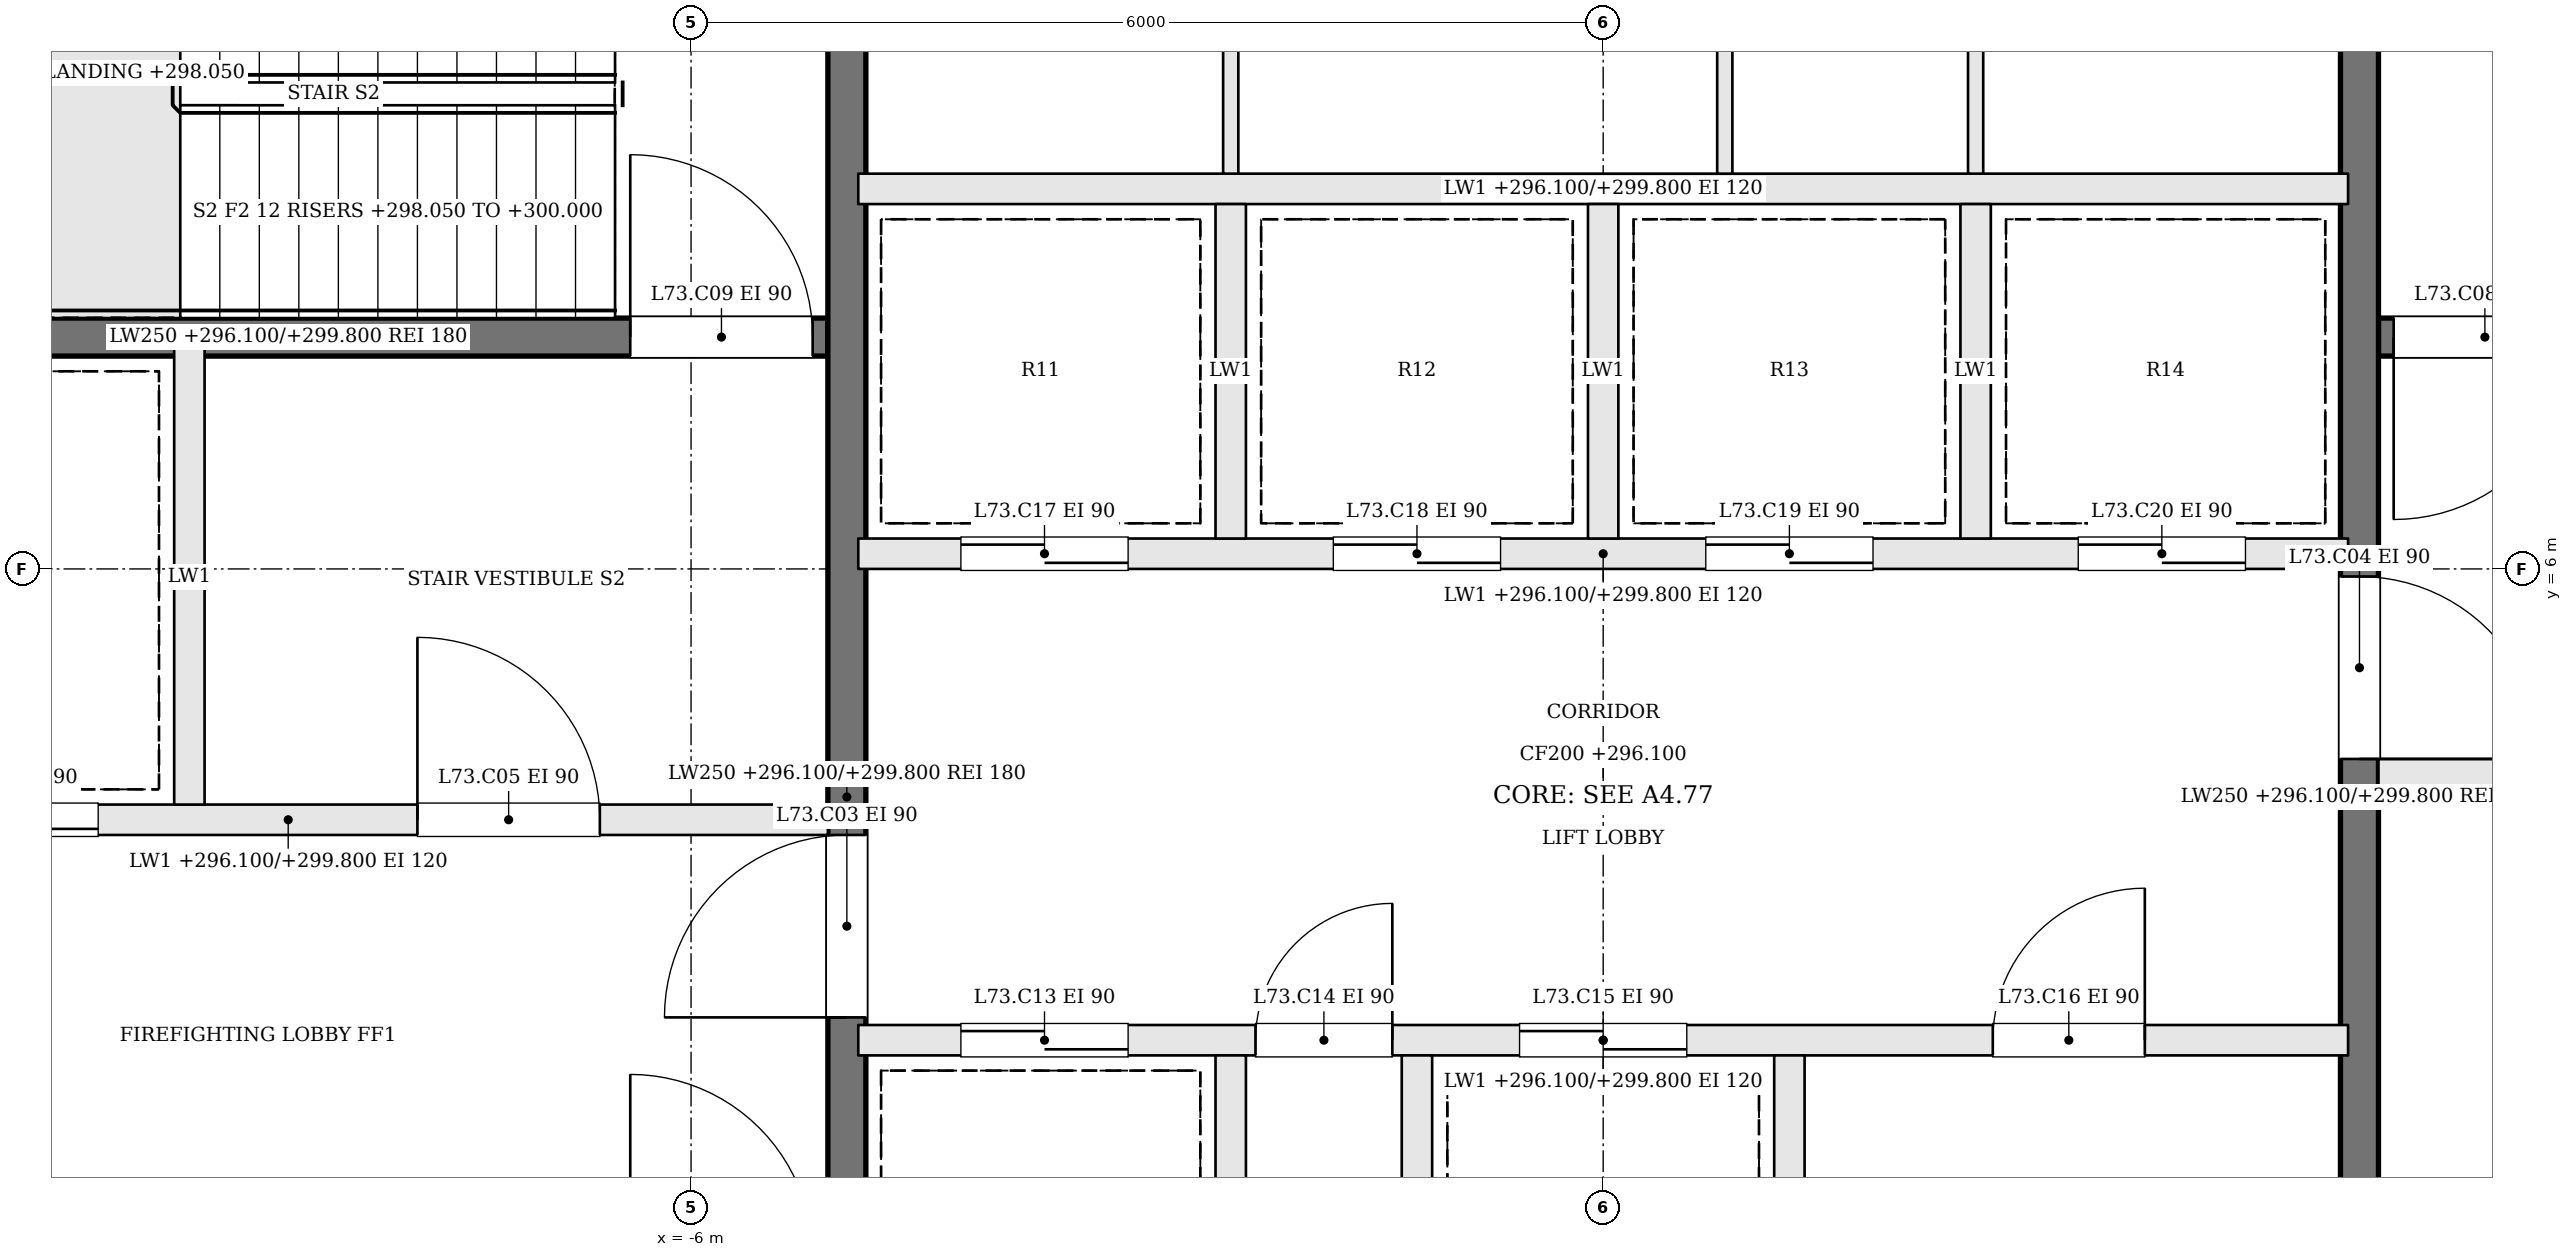
"""IFC4 building model, lengths in metres.
Left out: names, types, materials, properties, quantities, classifications, styles, units other than length and angle.
Written with IfcOpenShell. Run it as: python <this file> out.ifc"""

import sys

from ifc_helpers import new_model, si_unit, direction, frame, frame_2d, origin, place, context, subcontext, project, spatial, rectangle, extrude, element, fill, save


model = new_model("IFC4")
c1 = context("Model", 3, precision=1e-05, world=origin(), true_north=direction((0.0, 1.0)))
c2 = subcontext(c1, "Body", "Model", "MODEL_VIEW")
j1 = project(units=[si_unit("LENGTHUNIT", "METRE"), si_unit("PLANEANGLEUNIT", "RADIAN")], contexts=[c1])
p1 = place(None, origin())
s1 = spatial("IfcSite", under=j1, at=p1, CompositionType="ELEMENT")
p2 = place(p1, origin())
s2 = spatial("IfcBuilding", under=s1, at=p2, CompositionType="ELEMENT")
p3 = place(p2, frame((0.0, 0.0, 296.1)))
s3 = spatial("IfcBuildingStorey", under=s2, at=p3, CompositionType="ELEMENT", Elevation=296.1)
p4 = place(p3, frame((12.2, 7.525, 0.0), z_axis=(0.0, 0.0, 1.0), x_axis=(-1.0, 0.0, 0.0)))
e1 = element("IfcWall", 1, at=p4, inside=s3, PredefinedType="SOLIDWALL", context=c2, shape_type="SweptSolid", body=[
    extrude(rectangle(XDim=7.1, YDim=0.25, at=frame_2d((3.55, 0.0))), origin(), (0.0, 0.0, 1.0), 3.7),
])
p5 = place(p4, frame((5.8, 0.0, 0.0)))
e2 = element("IfcOpeningElement", 2, at=p5, cuts=e1, PredefinedType="OPENING", context=c2, shape_type="SweptSolid", body=[
    extrude(rectangle(XDim=1.2, YDim=2.1, at=frame_2d((0.6, 1.05))), frame((0.0, 0.135, 0.0), z_axis=(0.0, -1.0, 0.0), x_axis=(1.0, 0.0, 0.0)), (0.0, 0.0, 1.0), 0.27),
])
p6 = place(p3, frame((-12.2, 4.35, 0.0), z_axis=(0.0, 0.0, 1.0), x_axis=(1.0, 0.0, 0.0)))
e3 = element("IfcWall", 3, at=p6, inside=s3, PredefinedType="SOLIDWALL", context=c2, shape_type="SweptSolid", body=[
    extrude(rectangle(XDim=7.1, YDim=0.2, at=frame_2d((3.55, 0.0))), origin(), (0.0, 0.0, 1.0), 3.7),
])
p7 = place(p6, frame((4.4, 0.0, 0.0)))
e4 = element("IfcOpeningElement", 4, at=p7, cuts=e3, PredefinedType="OPENING", context=c2, shape_type="SweptSolid", body=[
    extrude(rectangle(XDim=1.2, YDim=2.1, at=frame_2d((0.6, 1.05))), frame((0.0, 0.11, 0.0), z_axis=(0.0, -1.0, 0.0), x_axis=(1.0, 0.0, 0.0)), (0.0, 0.0, 1.0), 0.22),
])
p8 = place(p6, frame((1.1, 0.0, 0.0)))
e5 = element("IfcOpeningElement", 5, at=p8, cuts=e3, PredefinedType="OPENING", context=c2, shape_type="SweptSolid", body=[
    extrude(rectangle(XDim=1.2, YDim=2.1, at=frame_2d((0.6, 1.05))), frame((0.0, 0.11, 0.0), z_axis=(0.0, -1.0, 0.0), x_axis=(1.0, 0.0, 0.0)), (0.0, 0.0, 1.0), 0.22),
])
p9 = place(p3, frame((12.2, 4.65, 0.0), z_axis=(0.0, 0.0, 1.0), x_axis=(-1.0, 0.0, 0.0)))
e6 = element("IfcWall", 6, at=p9, inside=s3, PredefinedType="SOLIDWALL", context=c2, shape_type="SweptSolid", body=[
    extrude(rectangle(XDim=7.1, YDim=0.2, at=frame_2d((3.55, 0.0))), origin(), (0.0, 0.0, 1.0), 3.7),
])
p10 = place(p9, frame((4.4, 0.0, 0.0)))
e7 = element("IfcOpeningElement", 7, at=p10, cuts=e6, PredefinedType="OPENING", context=c2, shape_type="SweptSolid", body=[
    extrude(rectangle(XDim=1.2, YDim=2.1, at=frame_2d((0.6, 1.05))), frame((0.0, 0.11, 0.0), z_axis=(0.0, -1.0, 0.0), x_axis=(1.0, 0.0, 0.0)), (0.0, 0.0, 1.0), 0.22),
])
p11 = place(p9, frame((1.1, 0.0, 0.0)))
e8 = element("IfcOpeningElement", 8, at=p11, cuts=e6, PredefinedType="OPENING", context=c2, shape_type="SweptSolid", body=[
    extrude(rectangle(XDim=1.2, YDim=2.1, at=frame_2d((0.6, 1.05))), frame((0.0, 0.11, 0.0), z_axis=(0.0, -1.0, 0.0), x_axis=(1.0, 0.0, 0.0)), (0.0, 0.0, 1.0), 0.22),
])
p12 = place(p3, frame((-12.2, 7.525, 0.0), z_axis=(0.0, 0.0, 1.0), x_axis=(1.0, 0.0, 0.0)))
e9 = element("IfcWall", 9, at=p12, inside=s3, PredefinedType="SOLIDWALL", context=c2, shape_type="SweptSolid", body=[
    extrude(rectangle(XDim=7.1, YDim=0.25, at=frame_2d((3.55, 0.0))), origin(), (0.0, 0.0, 1.0), 3.7),
])
p13 = place(p12, frame((5.8, 0.0, 0.0)))
e10 = element("IfcOpeningElement", 10, at=p13, cuts=e9, PredefinedType="OPENING", context=c2, shape_type="SweptSolid", body=[
    extrude(rectangle(XDim=1.2, YDim=2.1, at=frame_2d((0.6, 1.05))), frame((0.0, 0.135, 0.0), z_axis=(0.0, -1.0, 0.0), x_axis=(1.0, 0.0, 0.0)), (0.0, 0.0, 1.0), 0.27),
])
p14 = place(p3, frame((-9.3, 4.45, 0.0), z_axis=(0.0, 0.0, 1.0), x_axis=(0.0, 1.0, 0.0)))
e11 = element("IfcWall", 11, at=p14, inside=s3, PredefinedType="SOLIDWALL", context=c2, shape_type="SweptSolid", body=[
    extrude(rectangle(XDim=3.0, YDim=0.2, at=frame_2d((1.5, 0.0))), origin(), (0.0, 0.0, 1.0), 3.7),
])
p15 = place(p3, frame((-4.975, -2.2, 0.0), z_axis=(0.0, 0.0, 1.0), x_axis=(0.0, 1.0, 0.0)))
e12 = element("IfcWall", 12, at=p15, inside=s3, PredefinedType="SOLIDWALL", context=c2, shape_type="SweptSolid", body=[
    extrude(rectangle(XDim=13.4, YDim=0.25, at=frame_2d((6.7, 0.0))), origin(), (0.0, 0.0, 1.0), 3.7),
])
p16 = place(p15, frame((5.25, 0.0, 0.0)))
e13 = element("IfcOpeningElement", 13, at=p16, cuts=e12, PredefinedType="OPENING", context=c2, shape_type="SweptSolid", body=[
    extrude(rectangle(XDim=1.2, YDim=2.1, at=frame_2d((0.6, 1.05))), frame((0.0, 0.135, 0.0), z_axis=(0.0, -1.0, 0.0), x_axis=(1.0, 0.0, 0.0)), (0.0, 0.0, 1.0), 0.27),
])
p17 = place(p3, frame((4.975, 11.2, 0.0), z_axis=(0.0, 0.0, 1.0), x_axis=(0.0, -1.0, 0.0)))
e14 = element("IfcWall", 14, at=p17, inside=s3, PredefinedType="SOLIDWALL", context=c2, shape_type="SweptSolid", body=[
    extrude(rectangle(XDim=13.4, YDim=0.25, at=frame_2d((6.7, 0.0))), origin(), (0.0, 0.0, 1.0), 3.7),
])
p18 = place(p17, frame((5.25, 0.0, 0.0)))
e15 = element("IfcOpeningElement", 15, at=p18, cuts=e14, PredefinedType="OPENING", context=c2, shape_type="SweptSolid", body=[
    extrude(rectangle(XDim=1.2, YDim=2.1, at=frame_2d((0.6, 1.05))), frame((0.0, 0.135, 0.0), z_axis=(0.0, -1.0, 0.0), x_axis=(1.0, 0.0, 0.0)), (0.0, 0.0, 1.0), 0.27),
])
p19 = place(p3, frame((-4.9, 2.9, 0.0), z_axis=(0.0, 0.0, 1.0), x_axis=(1.0, 0.0, 0.0)))
e16 = element("IfcWall", 16, at=p19, inside=s3, PredefinedType="SOLIDWALL", context=c2, shape_type="SweptSolid", body=[
    extrude(rectangle(XDim=9.8, YDim=0.2, at=frame_2d((4.9, 0.0))), origin(), (0.0, 0.0, 1.0), 3.7),
])
p20 = place(p19, frame((0.675, 0.0, 0.0)))
e17 = element("IfcOpeningElement", 17, at=p20, cuts=e16, PredefinedType="OPENING", context=c2, shape_type="SweptSolid", body=[
    extrude(rectangle(XDim=1.1, YDim=2.1, at=frame_2d((0.55, 1.05))), frame((0.0, 0.11, 0.0), z_axis=(0.0, -1.0, 0.0), x_axis=(1.0, 0.0, 0.0)), (0.0, 0.0, 1.0), 0.22),
])
p21 = place(p19, frame((2.613, 0.0, 0.0)))
e18 = element("IfcOpeningElement", 18, at=p21, cuts=e16, PredefinedType="OPENING", context=c2, shape_type="SweptSolid", body=[
    extrude(rectangle(XDim=0.9, YDim=2.1, at=frame_2d((0.45, 1.05))), frame((0.0, 0.11, 0.0), z_axis=(0.0, -1.0, 0.0), x_axis=(1.0, 0.0, 0.0)), (0.0, 0.0, 1.0), 0.22),
])
p22 = place(p19, frame((4.35, 0.0, 0.0)))
e19 = element("IfcOpeningElement", 19, at=p22, cuts=e16, PredefinedType="OPENING", context=c2, shape_type="SweptSolid", body=[
    extrude(rectangle(XDim=1.1, YDim=2.1, at=frame_2d((0.55, 1.05))), frame((0.0, 0.11, 0.0), z_axis=(0.0, -1.0, 0.0), x_axis=(1.0, 0.0, 0.0)), (0.0, 0.0, 1.0), 0.22),
])
p23 = place(p19, frame((7.463, 0.0, 0.0)))
e20 = element("IfcOpeningElement", 20, at=p23, cuts=e16, PredefinedType="OPENING", context=c2, shape_type="SweptSolid", body=[
    extrude(rectangle(XDim=1.0, YDim=2.1, at=frame_2d((0.5, 1.05))), frame((0.0, 0.11, 0.0), z_axis=(0.0, -1.0, 0.0), x_axis=(1.0, 0.0, 0.0)), (0.0, 0.0, 1.0), 0.22),
])
p24 = place(p3, frame((-4.9, 6.1, 0.0), z_axis=(0.0, 0.0, 1.0), x_axis=(1.0, 0.0, 0.0)))
e21 = element("IfcWall", 21, at=p24, inside=s3, PredefinedType="SOLIDWALL", context=c2, shape_type="SweptSolid", body=[
    extrude(rectangle(XDim=9.8, YDim=0.2, at=frame_2d((4.9, 0.0))), origin(), (0.0, 0.0, 1.0), 3.7),
])
p25 = place(p24, frame((0.675, 0.0, 0.0)))
e22 = element("IfcOpeningElement", 22, at=p25, cuts=e21, PredefinedType="OPENING", context=c2, shape_type="SweptSolid", body=[
    extrude(rectangle(XDim=1.1, YDim=2.1, at=frame_2d((0.55, 1.05))), frame((0.0, 0.11, 0.0), z_axis=(0.0, -1.0, 0.0), x_axis=(1.0, 0.0, 0.0)), (0.0, 0.0, 1.0), 0.22),
])
p26 = place(p24, frame((3.125, 0.0, 0.0)))
e23 = element("IfcOpeningElement", 23, at=p26, cuts=e21, PredefinedType="OPENING", context=c2, shape_type="SweptSolid", body=[
    extrude(rectangle(XDim=1.1, YDim=2.1, at=frame_2d((0.55, 1.05))), frame((0.0, 0.11, 0.0), z_axis=(0.0, -1.0, 0.0), x_axis=(1.0, 0.0, 0.0)), (0.0, 0.0, 1.0), 0.22),
])
p27 = place(p24, frame((5.575, 0.0, 0.0)))
e24 = element("IfcOpeningElement", 24, at=p27, cuts=e21, PredefinedType="OPENING", context=c2, shape_type="SweptSolid", body=[
    extrude(rectangle(XDim=1.1, YDim=2.1, at=frame_2d((0.55, 1.05))), frame((0.0, 0.11, 0.0), z_axis=(0.0, -1.0, 0.0), x_axis=(1.0, 0.0, 0.0)), (0.0, 0.0, 1.0), 0.22),
])
p28 = place(p24, frame((8.025, 0.0, 0.0)))
e25 = element("IfcOpeningElement", 25, at=p28, cuts=e21, PredefinedType="OPENING", context=c2, shape_type="SweptSolid", body=[
    extrude(rectangle(XDim=1.1, YDim=2.1, at=frame_2d((0.55, 1.05))), frame((0.0, 0.11, 0.0), z_axis=(0.0, -1.0, 0.0), x_axis=(1.0, 0.0, 0.0)), (0.0, 0.0, 1.0), 0.22),
])
p29 = place(p3, frame((-4.9, 8.5, 0.0), z_axis=(0.0, 0.0, 1.0), x_axis=(1.0, 0.0, 0.0)))
e26 = element("IfcWall", 26, at=p29, inside=s3, PredefinedType="SOLIDWALL", context=c2, shape_type="SweptSolid", body=[
    extrude(rectangle(XDim=9.8, YDim=0.2, at=frame_2d((4.9, 0.0))), origin(), (0.0, 0.0, 1.0), 3.7),
])
for number, where, z_axis, x_axis in (
    (27, (-2.45, 0.6, 0.0), (0.0, 0.0, 1.0), (0.0, 1.0, 0.0)),
    (28, (-1.225, 0.6, 0.0), (0.0, 0.0, 1.0), (0.0, 1.0, 0.0)),
    (29, (1.225, 0.6, 0.0), (0.0, 0.0, 1.0), (0.0, 1.0, 0.0)),
    (30, (-2.45, 6.2, 0.0), (0.0, 0.0, 1.0), (0.0, 1.0, 0.0)),
    (31, (0.0, 6.2, 0.0), (0.0, 0.0, 1.0), (0.0, 1.0, 0.0)),
    (32, (2.45, 6.2, 0.0), (0.0, 0.0, 1.0), (0.0, 1.0, 0.0)),
):
    element("IfcWall", number, at=place(p3, frame(where, z_axis=z_axis, x_axis=x_axis)), inside=s3, PredefinedType="SOLIDWALL", context=c2, shape_type="SweptSolid", body=[
        extrude(rectangle(XDim=2.2, YDim=0.2, at=frame_2d((1.1, 0.0))), origin(), (0.0, 0.0, 1.0), 3.7),
    ])
for number, where, z_axis, x_axis in (
    (33, (-2.45, 8.6, 0.0), (0.0, 0.0, 1.0), (0.0, 1.0, 0.0)),
    (34, (0.8, 8.6, 0.0), (0.0, 0.0, 1.0), (0.0, 1.0, 0.0)),
    (35, (2.45, 8.6, 0.0), (0.0, 0.0, 1.0), (0.0, 1.0, 0.0)),
):
    element("IfcWall", number, at=place(p3, frame(where, z_axis=z_axis, x_axis=x_axis)), inside=s3, PredefinedType="PARTITIONING", context=c2, shape_type="SweptSolid", body=[
        extrude(rectangle(XDim=2.6, YDim=0.1, at=frame_2d((1.3, 0.0))), origin(), (0.0, 0.0, 1.0), 3.7),
    ])
p30 = place(p16, origin())
e36 = element("IfcDoor", 36, at=p30, inside=s3, OperationType="SINGLE_SWING_LEFT", PredefinedType="DOOR", context=c2, shape_type="SweptSolid", body=[
    extrude(rectangle(XDim=1.2, YDim=2.1, at=frame_2d((0.6, 1.05))), frame((0.0, 0.025, 0.0), z_axis=(0.0, -1.0, 0.0), x_axis=(1.0, 0.0, 0.0)), (0.0, 0.0, 1.0), 0.05),
])
fill(e13, e36)
p31 = place(p18, origin())
e37 = element("IfcDoor", 37, at=p31, inside=s3, OperationType="SINGLE_SWING_RIGHT", PredefinedType="DOOR", context=c2, shape_type="SweptSolid", body=[
    extrude(rectangle(XDim=1.2, YDim=2.1, at=frame_2d((0.6, 1.05))), frame((0.0, 0.025, 0.0), z_axis=(0.0, -1.0, 0.0), x_axis=(1.0, 0.0, 0.0)), (0.0, 0.0, 1.0), 0.05),
])
fill(e15, e37)
p32 = place(p7, origin())
e38 = element("IfcDoor", 38, at=p32, inside=s3, OperationType="SINGLE_SWING_LEFT", PredefinedType="DOOR", context=c2, shape_type="SweptSolid", body=[
    extrude(rectangle(XDim=1.2, YDim=2.1, at=frame_2d((0.6, 1.05))), frame((0.0, 0.025, 0.0), z_axis=(0.0, -1.0, 0.0), x_axis=(1.0, 0.0, 0.0)), (0.0, 0.0, 1.0), 0.05),
])
fill(e4, e38)
p33 = place(p5, origin())
e39 = element("IfcDoor", 39, at=p33, inside=s3, OperationType="SINGLE_SWING_RIGHT", PredefinedType="DOOR", context=c2, shape_type="SweptSolid", body=[
    extrude(rectangle(XDim=1.2, YDim=2.1, at=frame_2d((0.6, 1.05))), frame((0.0, 0.025, 0.0), z_axis=(0.0, -1.0, 0.0), x_axis=(1.0, 0.0, 0.0)), (0.0, 0.0, 1.0), 0.05),
])
fill(e2, e39)
p34 = place(p13, origin())
e40 = element("IfcDoor", 40, at=p34, inside=s3, OperationType="SINGLE_SWING_LEFT", PredefinedType="DOOR", context=c2, shape_type="SweptSolid", body=[
    extrude(rectangle(XDim=1.2, YDim=2.1, at=frame_2d((0.6, 1.05))), frame((0.0, 0.025, 0.0), z_axis=(0.0, -1.0, 0.0), x_axis=(1.0, 0.0, 0.0)), (0.0, 0.0, 1.0), 0.05),
])
fill(e10, e40)
p35 = place(p8, origin())
e41 = element("IfcDoor", 41, at=p35, inside=s3, OperationType="SLIDING_TO_RIGHT", PredefinedType="DOOR", context=c2, shape_type="SweptSolid", body=[
    extrude(rectangle(XDim=1.2, YDim=2.1, at=frame_2d((0.6, 1.05))), frame((0.0, 0.025, 0.0), z_axis=(0.0, -1.0, 0.0), x_axis=(1.0, 0.0, 0.0)), (0.0, 0.0, 1.0), 0.05),
])
fill(e5, e41)
p36 = place(p20, origin())
e42 = element("IfcDoor", 42, at=p36, inside=s3, OperationType="SLIDING_TO_RIGHT", PredefinedType="DOOR", context=c2, shape_type="SweptSolid", body=[
    extrude(rectangle(XDim=1.1, YDim=2.1, at=frame_2d((0.55, 1.05))), frame((0.0, 0.025, 0.0), z_axis=(0.0, -1.0, 0.0), x_axis=(1.0, 0.0, 0.0)), (0.0, 0.0, 1.0), 0.05),
])
fill(e17, e42)
p37 = place(p21, origin())
e43 = element("IfcDoor", 43, at=p37, inside=s3, OperationType="SINGLE_SWING_RIGHT", PredefinedType="DOOR", context=c2, shape_type="SweptSolid", body=[
    extrude(rectangle(XDim=0.9, YDim=2.1, at=frame_2d((0.45, 1.05))), frame((0.0, 0.025, 0.0), z_axis=(0.0, -1.0, 0.0), x_axis=(1.0, 0.0, 0.0)), (0.0, 0.0, 1.0), 0.05),
])
fill(e18, e43)
p38 = place(p22, origin())
e44 = element("IfcDoor", 44, at=p38, inside=s3, OperationType="SLIDING_TO_LEFT", PredefinedType="DOOR", context=c2, shape_type="SweptSolid", body=[
    extrude(rectangle(XDim=1.1, YDim=2.1, at=frame_2d((0.55, 1.05))), frame((0.0, 0.025, 0.0), z_axis=(0.0, -1.0, 0.0), x_axis=(1.0, 0.0, 0.0)), (0.0, 0.0, 1.0), 0.05),
])
fill(e19, e44)
p39 = place(p23, origin())
e45 = element("IfcDoor", 45, at=p39, inside=s3, OperationType="SINGLE_SWING_RIGHT", PredefinedType="DOOR", context=c2, shape_type="SweptSolid", body=[
    extrude(rectangle(XDim=1.0, YDim=2.1, at=frame_2d((0.5, 1.05))), frame((0.0, 0.025, 0.0), z_axis=(0.0, -1.0, 0.0), x_axis=(1.0, 0.0, 0.0)), (0.0, 0.0, 1.0), 0.05),
])
fill(e20, e45)
p40 = place(p25, origin())
e46 = element("IfcDoor", 46, at=p40, inside=s3, OperationType="SLIDING_TO_RIGHT", PredefinedType="DOOR", context=c2, shape_type="SweptSolid", body=[
    extrude(rectangle(XDim=1.1, YDim=2.1, at=frame_2d((0.55, 1.05))), frame((0.0, 0.025, 0.0), z_axis=(0.0, -1.0, 0.0), x_axis=(1.0, 0.0, 0.0)), (0.0, 0.0, 1.0), 0.05),
])
fill(e22, e46)
p41 = place(p26, origin())
e47 = element("IfcDoor", 47, at=p41, inside=s3, OperationType="SLIDING_TO_LEFT", PredefinedType="DOOR", context=c2, shape_type="SweptSolid", body=[
    extrude(rectangle(XDim=1.1, YDim=2.1, at=frame_2d((0.55, 1.05))), frame((0.0, 0.025, 0.0), z_axis=(0.0, -1.0, 0.0), x_axis=(1.0, 0.0, 0.0)), (0.0, 0.0, 1.0), 0.05),
])
fill(e23, e47)
p42 = place(p27, origin())
e48 = element("IfcDoor", 48, at=p42, inside=s3, OperationType="SLIDING_TO_RIGHT", PredefinedType="DOOR", context=c2, shape_type="SweptSolid", body=[
    extrude(rectangle(XDim=1.1, YDim=2.1, at=frame_2d((0.55, 1.05))), frame((0.0, 0.025, 0.0), z_axis=(0.0, -1.0, 0.0), x_axis=(1.0, 0.0, 0.0)), (0.0, 0.0, 1.0), 0.05),
])
fill(e24, e48)
p43 = place(p28, origin())
e49 = element("IfcDoor", 49, at=p43, inside=s3, OperationType="SLIDING_TO_LEFT", PredefinedType="DOOR", context=c2, shape_type="SweptSolid", body=[
    extrude(rectangle(XDim=1.1, YDim=2.1, at=frame_2d((0.55, 1.05))), frame((0.0, 0.025, 0.0), z_axis=(0.0, -1.0, 0.0), x_axis=(1.0, 0.0, 0.0)), (0.0, 0.0, 1.0), 0.05),
])
fill(e25, e49)
save(model, sys.argv[1])
